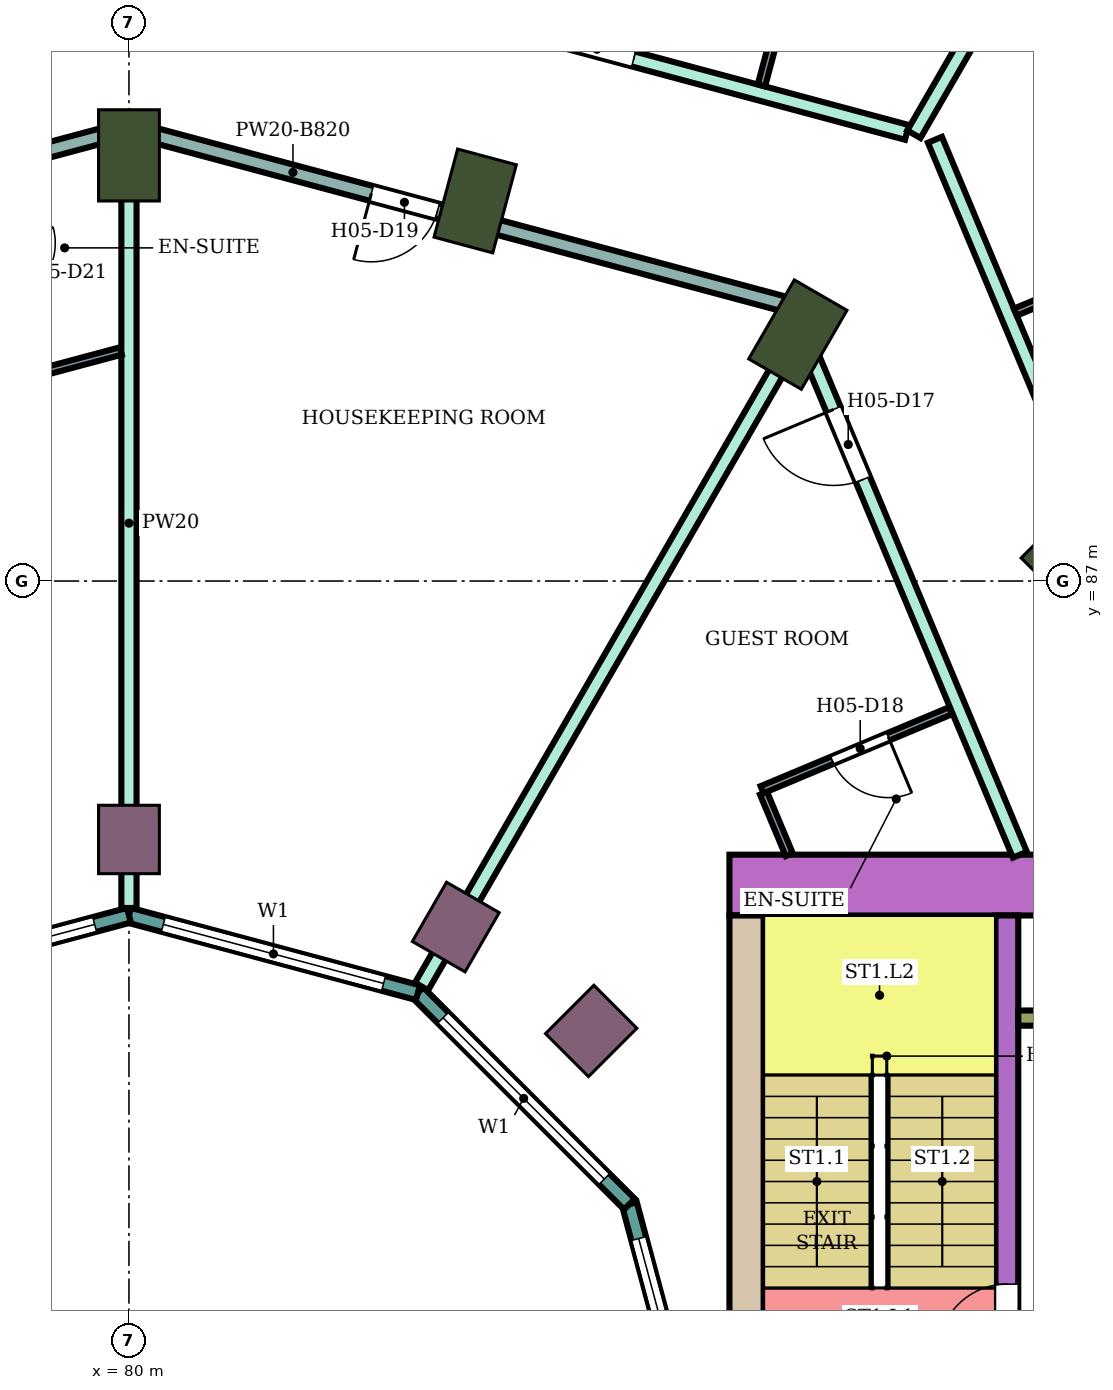
"""IFC4 building model, lengths in metres.
Left out: names, types, materials, properties, quantities, classifications, styles, units other than length and angle.
Written with IfcOpenShell. Run it as: python <this file> out.ifc"""

import sys

from ifc_helpers import new_model, si_unit, direction, frame, frame_2d, origin, origin_2d, place, context, subcontext, project, spatial, rectangle, extrude, element, fill, save


model = new_model("IFC4")
c1 = context("Model", 3, precision=1e-05, world=origin(), true_north=direction((0.0, 1.0)))
c2 = subcontext(c1, "Body", "Model", "MODEL_VIEW")
j1 = project(units=[si_unit("LENGTHUNIT", "METRE"), si_unit("PLANEANGLEUNIT", "RADIAN")], contexts=[c1])
p1 = place(None, origin())
s1 = spatial("IfcSite", under=j1, at=p1, CompositionType="ELEMENT")
p2 = place(p1, origin())
s2 = spatial("IfcBuilding", under=s1, at=p2, CompositionType="ELEMENT")
p3 = place(p2, frame((0.0, 0.0, 90.0)))
s3 = spatial("IfcBuildingStorey", under=s2, at=p3, CompositionType="ELEMENT", Elevation=90.0)
for number, where, z_axis, x_axis in (
    (1, (92.445, 87.445, 0.0), (0.0, 0.0, 1.0), (0.707, 0.707, 0.0)),
    (2, (88.8, 90.242, 0.0), (0.0, 0.0, 1.0), (0.5, 0.866, 0.0)),
    (3, (84.555, 92.0, 0.0), (0.0, 0.0, 1.0), (0.259, 0.966, 0.0)),
    (4, (80.0, 92.6, 0.0), (0.0, 0.0, 1.0), (0.0, 1.0, 0.0)),
):
    element("IfcColumn", number, at=place(p3, frame(where, z_axis=z_axis, x_axis=x_axis)), inside=s3, PredefinedType="COLUMN", context=c2, shape_type="SweptSolid", body=[
        extrude(rectangle(XDim=1.2, YDim=0.8, at=origin_2d()), origin(), (0.0, 0.0, 1.0), 3.8),
    ])
for number, where, z_axis, x_axis in (
    (5, (86.081, 81.081, 0.0), (0.0, 0.0, 1.0), (0.707, 0.707, 0.0)),
    (6, (84.3, 82.448, 0.0), (0.0, 0.0, 1.0), (0.5, 0.866, 0.0)),
    (7, (80.0, 83.6, 0.0), (0.0, 0.0, 1.0), (0.0, 1.0, 0.0)),
):
    element("IfcColumn", number, at=place(p3, frame(where, z_axis=z_axis, x_axis=x_axis)), inside=s3, PredefinedType="COLUMN", context=c2, shape_type="SweptSolid", body=[
        extrude(rectangle(XDim=0.9, YDim=0.8, at=origin_2d()), origin(), (0.0, 0.0, 1.0), 3.8),
    ])
p4 = place(p3, frame((87.9, 83.0, 0.0), z_axis=(0.0, 0.0, 1.0), x_axis=(1.0, 0.0, 0.0)))
e8 = element("IfcWall", 8, at=p4, inside=s3, PredefinedType="SHEAR", context=c2, shape_type="SweptSolid", body=[
    extrude(rectangle(XDim=14.7, YDim=0.8, at=frame_2d((7.35, 0.0))), origin(), (0.0, 0.0, 1.0), 3.48),
])
p5 = place(p4, frame((4.2, 0.0, 0.0)))
e9 = element("IfcOpeningElement", 9, at=p5, cuts=e8, PredefinedType="OPENING", context=c2, shape_type="SweptSolid", body=[
    extrude(rectangle(XDim=2.4, YDim=2.4, at=frame_2d((1.2, 1.2))), frame((0.0, 0.41, 0.0), z_axis=(0.0, -1.0, 0.0), x_axis=(1.0, 0.0, 0.0)), (0.0, 0.0, 1.0), 0.82),
])
p6 = place(p3, frame((88.125, 75.0, 0.0), z_axis=(0.0, 0.0, 1.0), x_axis=(0.0, 1.0, 0.0)))
e10 = element("IfcWall", 10, at=p6, inside=s3, PredefinedType="SHEAR", context=c2, shape_type="SweptSolid", body=[
    extrude(rectangle(XDim=7.6, YDim=0.45, at=frame_2d((3.8, 0.0))), origin(), (0.0, 0.0, 1.0), 3.48),
])
p7 = place(p3, frame((91.55, 75.0, 0.0), z_axis=(0.0, 0.0, 1.0), x_axis=(0.0, 1.0, 0.0)))
e11 = element("IfcWall", 11, at=p7, inside=s3, PredefinedType="SHEAR", context=c2, shape_type="SweptSolid", body=[
    extrude(rectangle(XDim=7.6, YDim=0.3, at=frame_2d((3.8, 0.0))), origin(), (0.0, 0.0, 1.0), 3.48),
])
p8 = place(p7, frame((1.85, 0.0, 0.0)))
e12 = element("IfcOpeningElement", 12, at=p8, cuts=e11, PredefinedType="OPENING", context=c2, shape_type="SweptSolid", body=[
    extrude(rectangle(XDim=0.9, YDim=2.1, at=frame_2d((0.45, 1.05))), frame((0.0, 0.16, 0.0), z_axis=(0.0, -1.0, 0.0), x_axis=(1.0, 0.0, 0.0)), (0.0, 0.0, 1.0), 0.32),
])
p9 = place(p3, frame((91.7, 81.25, 0.0), z_axis=(0.0, 0.0, 1.0), x_axis=(1.0, 0.0, 0.0)))
e13 = element("IfcWall", 13, at=p9, inside=s3, PredefinedType="SHEAR", context=c2, shape_type="SweptSolid", body=[
    extrude(rectangle(XDim=4.65, YDim=0.2, at=frame_2d((2.325, 0.0))), origin(), (0.0, 0.0, 1.0), 3.48),
])
p10 = place(p3, frame((87.604, 75.0, 0.0), z_axis=(0.0, 0.0, 1.0), x_axis=(-0.258789828301, 0.965933654434, 0.0)))
e14 = element("IfcWall", 14, at=p10, inside=s3, PredefinedType="NOTDEFINED", context=c2, shape_type="SweptSolid", body=[
    extrude(rectangle(XDim=3.936, YDim=0.2, at=frame_2d((1.968, 0.0))), origin(), (0.0, 0.0, 1.0), 3.8),
])
p11 = place(p10, frame((0.468, 0.0, 0.9)))
e15 = element("IfcOpeningElement", 15, at=p11, cuts=e14, PredefinedType="OPENING", context=c2, shape_type="SweptSolid", body=[
    extrude(rectangle(XDim=3.0, YDim=2.3, at=frame_2d((1.5, 1.15))), frame((0.0, 0.11, 0.0), z_axis=(0.0, -1.0, 0.0), x_axis=(1.0, 0.0, 0.0)), (0.0, 0.0, 1.0), 0.22),
])
p12 = place(p3, frame((86.585, 78.802, 0.0), z_axis=(0.0, 0.0, 1.0), x_axis=(-0.707106781187, 0.707106781187, 0.0)))
e16 = element("IfcWall", 16, at=p12, inside=s3, PredefinedType="NOTDEFINED", context=c2, shape_type="SweptSolid", body=[
    extrude(rectangle(XDim=3.936, YDim=0.2, at=frame_2d((1.968, 0.0))), origin(), (0.0, 0.0, 1.0), 3.8),
])
p13 = place(p12, frame((0.468, 0.0, 0.9)))
e17 = element("IfcOpeningElement", 17, at=p13, cuts=e16, PredefinedType="OPENING", context=c2, shape_type="SweptSolid", body=[
    extrude(rectangle(XDim=3.0, YDim=2.3, at=frame_2d((1.5, 1.15))), frame((0.0, 0.11, 0.0), z_axis=(0.0, -1.0, 0.0), x_axis=(1.0, 0.0, 0.0)), (0.0, 0.0, 1.0), 0.22),
])
p14 = place(p3, frame((83.802, 81.585, 0.0), z_axis=(0.0, 0.0, 1.0), x_axis=(-0.965933654434, 0.258789828301, 0.0)))
e18 = element("IfcWall", 18, at=p14, inside=s3, PredefinedType="NOTDEFINED", context=c2, shape_type="SweptSolid", body=[
    extrude(rectangle(XDim=3.936, YDim=0.2, at=frame_2d((1.968, 0.0))), origin(), (0.0, 0.0, 1.0), 3.8),
])
p15 = place(p14, frame((0.468, 0.0, 0.9)))
e19 = element("IfcOpeningElement", 19, at=p15, cuts=e18, PredefinedType="OPENING", context=c2, shape_type="SweptSolid", body=[
    extrude(rectangle(XDim=3.0, YDim=2.3, at=frame_2d((1.5, 1.15))), frame((0.0, 0.11, 0.0), z_axis=(0.0, -1.0, 0.0), x_axis=(1.0, 0.0, 0.0)), (0.0, 0.0, 1.0), 0.22),
])
p16 = place(p3, frame((80.0, 82.604, 0.0), z_axis=(0.0, 0.0, 1.0), x_axis=(-0.965933654434, -0.258789828301, 0.0)))
e20 = element("IfcWall", 20, at=p16, inside=s3, PredefinedType="NOTDEFINED", context=c2, shape_type="SweptSolid", body=[
    extrude(rectangle(XDim=3.936, YDim=0.2, at=frame_2d((1.968, 0.0))), origin(), (0.0, 0.0, 1.0), 3.8),
])
p17 = place(p16, frame((0.468, 0.0, 0.9)))
e21 = element("IfcOpeningElement", 21, at=p17, cuts=e20, PredefinedType="OPENING", context=c2, shape_type="SweptSolid", body=[
    extrude(rectangle(XDim=3.0, YDim=2.3, at=frame_2d((1.5, 1.15))), frame((0.0, 0.11, 0.0), z_axis=(0.0, -1.0, 0.0), x_axis=(1.0, 0.0, 0.0)), (0.0, 0.0, 1.0), 0.22),
])
p18 = place(p3, frame((69.397, 92.805, 0.0), z_axis=(0.0, 0.0, 1.0), x_axis=(0.96596468683, 0.258673972015, 0.0)))
e22 = element("IfcWall", 22, at=p18, inside=s3, PredefinedType="PARTITIONING", context=c2, shape_type="SweptSolid", body=[
    extrude(rectangle(XDim=10.937, YDim=0.2, at=frame_2d((5.469, 0.0))), origin(), (0.0, 0.0, 1.0), 3.35),
])
p19 = place(p18, frame((6.163, 0.0, 0.0)))
e23 = element("IfcOpeningElement", 23, at=p19, cuts=e22, PredefinedType="OPENING", context=c2, shape_type="SweptSolid", body=[
    extrude(rectangle(XDim=1.0, YDim=2.1, at=frame_2d((0.5, 1.05))), frame((0.0, 0.11, 0.0), z_axis=(0.0, -1.0, 0.0), x_axis=(1.0, 0.0, 0.0)), (0.0, 0.0, 1.0), 0.22),
])
p20 = place(p18, frame((4.103, 0.0, 0.0)))
e24 = element("IfcOpeningElement", 24, at=p20, cuts=e22, PredefinedType="OPENING", context=c2, shape_type="SweptSolid", body=[
    extrude(rectangle(XDim=1.0, YDim=2.1, at=frame_2d((0.5, 1.05))), frame((0.0, 0.11, 0.0), z_axis=(0.0, -1.0, 0.0), x_axis=(1.0, 0.0, 0.0)), (0.0, 0.0, 1.0), 0.22),
])
p21 = place(p3, frame((71.303, 90.625, 0.0), z_axis=(0.0, 0.0, 1.0), x_axis=(0.965971868307, 0.258647152776, 0.0)))
e25 = element("IfcWall", 25, at=p21, inside=s3, PredefinedType="PARTITIONING", context=c2, shape_type="SweptSolid", body=[
    extrude(rectangle(XDim=8.874, YDim=0.2, at=frame_2d((4.437, 0.0))), origin(), (0.0, 0.0, 1.0), 2.98),
])
p22 = place(p21, frame((0.55, 0.0, 0.0)))
e26 = element("IfcOpeningElement", 26, at=p22, cuts=e25, PredefinedType="OPENING", context=c2, shape_type="SweptSolid", body=[
    extrude(rectangle(XDim=1.0, YDim=2.1, at=frame_2d((0.5, 1.05))), frame((0.0, 0.11, 0.0), z_axis=(0.0, -1.0, 0.0), x_axis=(1.0, 0.0, 0.0)), (0.0, 0.0, 1.0), 0.22),
])
p23 = place(p3, frame((80.0, 82.699, 0.0), z_axis=(0.0, 0.0, 1.0), x_axis=(0.0, 1.0, 0.0)))
e27 = element("IfcWall", 27, at=p23, inside=s3, PredefinedType="PARTITIONING", context=c2, shape_type="SweptSolid", body=[
    extrude(rectangle(XDim=10.125, YDim=0.2, at=frame_2d((5.062, 0.0))), origin(), (0.0, 0.0, 1.0), 3.35),
])
p24 = place(p3, frame((80.0, 92.954, 0.0), z_axis=(0.0, 0.0, 1.0), x_axis=(0.965932194462, -0.258795277586, 0.0)))
e28 = element("IfcWall", 28, at=p24, inside=s3, PredefinedType="PARTITIONING", context=c2, shape_type="SweptSolid", body=[
    extrude(rectangle(XDim=8.934, YDim=0.2, at=frame_2d((4.467, 0.0))), origin(), (0.0, 0.0, 1.0), 2.98),
])
p25 = place(p24, frame((3.302, 0.0, 0.0)))
e29 = element("IfcOpeningElement", 29, at=p25, cuts=e28, PredefinedType="OPENING", context=c2, shape_type="SweptSolid", body=[
    extrude(rectangle(XDim=0.9, YDim=2.1, at=frame_2d((0.45, 1.05))), frame((0.0, 0.11, 0.0), z_axis=(0.0, -1.0, 0.0), x_axis=(1.0, 0.0, 0.0)), (0.0, 0.0, 1.0), 0.22),
])
p26 = place(p3, frame((80.0, 95.648, 0.0), z_axis=(0.0, 0.0, 1.0), x_axis=(0.965852259202, -0.259093445292, 0.0)))
e30 = element("IfcWall", 30, at=p26, inside=s3, PredefinedType="PARTITIONING", context=c2, shape_type="SweptSolid", body=[
    extrude(rectangle(XDim=10.597, YDim=0.2, at=frame_2d((5.298, 0.0))), origin(), (0.0, 0.0, 1.0), 3.35),
])
p27 = place(p26, frame((5.875, 0.0, 0.0)))
e31 = element("IfcOpeningElement", 31, at=p27, cuts=e30, PredefinedType="OPENING", context=c2, shape_type="SweptSolid", body=[
    extrude(rectangle(XDim=1.0, YDim=2.1, at=frame_2d((0.5, 1.05))), frame((0.0, 0.11, 0.0), z_axis=(0.0, -1.0, 0.0), x_axis=(1.0, 0.0, 0.0)), (0.0, 0.0, 1.0), 0.22),
])
p28 = place(p3, frame((83.85, 81.667, 0.0), z_axis=(0.0, 0.0, 1.0), x_axis=(0.500222212082, 0.865897071562, 0.0)))
e32 = element("IfcWall", 32, at=p28, inside=s3, PredefinedType="PARTITIONING", context=c2, shape_type="SweptSolid", body=[
    extrude(rectangle(XDim=9.768, YDim=0.2, at=frame_2d((4.884, 0.0))), origin(), (0.0, 0.0, 1.0), 3.35),
])
p29 = place(p3, frame((88.698, 90.624, 0.0), z_axis=(0.0, 0.0, 1.0), x_axis=(0.386027055918, -0.922487459047, 0.0)))
e33 = element("IfcWall", 33, at=p29, inside=s3, PredefinedType="PARTITIONING", context=c2, shape_type="SweptSolid", body=[
    extrude(rectangle(XDim=7.832, YDim=0.2, at=frame_2d((3.916, 0.0))), origin(), (0.0, 0.0, 1.0), 3.35),
])
p30 = place(p29, frame((1.482, 0.0, 0.0)))
e34 = element("IfcOpeningElement", 34, at=p30, cuts=e33, PredefinedType="OPENING", context=c2, shape_type="SweptSolid", body=[
    extrude(rectangle(XDim=1.0, YDim=2.1, at=frame_2d((0.5, 1.05))), frame((0.0, 0.11, 0.0), z_axis=(0.0, -1.0, 0.0), x_axis=(1.0, 0.0, 0.0)), (0.0, 0.0, 1.0), 0.22),
])
p31 = place(p3, frame((90.327, 92.878, 0.0), z_axis=(0.0, 0.0, 1.0), x_axis=(0.50022153717, 0.865897461453, 0.0)))
e35 = element("IfcWall", 35, at=p31, inside=s3, PredefinedType="PARTITIONING", context=c2, shape_type="SweptSolid", body=[
    extrude(rectangle(XDim=5.152, YDim=0.2, at=frame_2d((2.576, 0.0))), origin(), (0.0, 0.0, 1.0), 3.35),
])
p32 = place(p3, frame((90.604, 92.805, 0.0), z_axis=(0.0, 0.0, 1.0), x_axis=(0.386209298583, -0.922411176042, 0.0)))
e36 = element("IfcWall", 36, at=p32, inside=s3, PredefinedType="PARTITIONING", context=c2, shape_type="SweptSolid", body=[
    extrude(rectangle(XDim=8.48, YDim=0.2, at=frame_2d((4.24, 0.0))), origin(), (0.0, 0.0, 1.0), 3.35),
])
p33 = place(p32, frame((3.723, 0.0, 0.0)))
e37 = element("IfcOpeningElement", 37, at=p33, cuts=e36, PredefinedType="OPENING", context=c2, shape_type="SweptSolid", body=[
    extrude(rectangle(XDim=1.1, YDim=2.1, at=frame_2d((0.55, 1.05))), frame((0.0, 0.11, 0.0), z_axis=(0.0, -1.0, 0.0), x_axis=(1.0, 0.0, 0.0)), (0.0, 0.0, 1.0), 0.22),
])
p34 = place(p3, frame((78.696, 89.706, 0.0), z_axis=(0.0, 0.0, 1.0), x_axis=(0.966002513606, 0.258532674351, 0.0)))
e38 = element("IfcWall", 38, at=p34, inside=s3, PredefinedType="PARTITIONING", context=c2, shape_type="SweptSolid", body=[
    extrude(rectangle(XDim=1.24, YDim=0.1, at=frame_2d((0.62, 0.0))), origin(), (0.0, 0.0, 1.0), 3.35),
])
p35 = place(p3, frame((88.321, 93.521, 0.0), z_axis=(0.0, 0.0, 1.0), x_axis=(0.258677737588, 0.965963678446, 0.0)))
e39 = element("IfcWall", 39, at=p35, inside=s3, PredefinedType="PARTITIONING", context=c2, shape_type="SweptSolid", body=[
    extrude(rectangle(XDim=2.649, YDim=0.1, at=frame_2d((1.325, 0.0))), origin(), (0.0, 0.0, 1.0), 3.35),
])
p36 = place(p3, frame((88.348, 84.209, 0.0), z_axis=(0.0, 0.0, 1.0), x_axis=(0.386077497504, -0.922466349479, 0.0)))
e40 = element("IfcWall", 40, at=p36, inside=s3, PredefinedType="PARTITIONING", context=c2, shape_type="SweptSolid", body=[
    extrude(rectangle(XDim=0.877, YDim=0.1, at=frame_2d((0.438, 0.0))), origin(), (0.0, 0.0, 1.0), 3.35),
])
p37 = place(p3, frame((88.329, 84.255, 0.0), z_axis=(0.0, 0.0, 1.0), x_axis=(0.922320663728, 0.386425404522, 0.0)))
e41 = element("IfcWall", 41, at=p37, inside=s3, PredefinedType="PARTITIONING", context=c2, shape_type="SweptSolid", body=[
    extrude(rectangle(XDim=2.69, YDim=0.1, at=frame_2d((1.345, 0.0))), origin(), (0.0, 0.0, 1.0), 3.35),
])
p38 = place(p37, frame((1.0, 0.0, 0.0)))
e42 = element("IfcOpeningElement", 42, at=p38, cuts=e41, PredefinedType="OPENING", context=c2, shape_type="SweptSolid", body=[
    extrude(rectangle(XDim=0.8, YDim=2.1, at=frame_2d((0.4, 1.05))), frame((0.0, 0.06, 0.0), z_axis=(0.0, -1.0, 0.0), x_axis=(1.0, 0.0, 0.0)), (0.0, 0.0, 1.0), 0.12),
])
p39 = place(p3, frame((91.661, 90.538, 0.0), z_axis=(0.0, 0.0, 1.0), x_axis=(0.922352973625, 0.386348278169, 0.0)))
e43 = element("IfcWall", 43, at=p39, inside=s3, PredefinedType="PARTITIONING", context=c2, shape_type="SweptSolid", body=[
    extrude(rectangle(XDim=2.85, YDim=0.1, at=frame_2d((1.425, 0.0))), origin(), (0.0, 0.0, 1.0), 3.35),
])
p40 = place(p11, origin())
e44 = element("IfcWindow", 44, at=p40, inside=s3, PartitioningType="SINGLE_PANEL", PredefinedType="WINDOW", context=c2, shape_type="SweptSolid", body=[
    extrude(rectangle(XDim=3.0, YDim=2.3, at=frame_2d((1.5, 1.15))), frame((0.0, 0.03, 0.0), z_axis=(0.0, -1.0, 0.0), x_axis=(1.0, 0.0, 0.0)), (0.0, 0.0, 1.0), 0.06),
])
fill(e15, e44)
p41 = place(p13, origin())
e45 = element("IfcWindow", 45, at=p41, inside=s3, PartitioningType="SINGLE_PANEL", PredefinedType="WINDOW", context=c2, shape_type="SweptSolid", body=[
    extrude(rectangle(XDim=3.0, YDim=2.3, at=frame_2d((1.5, 1.15))), frame((0.0, 0.03, 0.0), z_axis=(0.0, -1.0, 0.0), x_axis=(1.0, 0.0, 0.0)), (0.0, 0.0, 1.0), 0.06),
])
fill(e17, e45)
p42 = place(p15, origin())
e46 = element("IfcWindow", 46, at=p42, inside=s3, PartitioningType="SINGLE_PANEL", PredefinedType="WINDOW", context=c2, shape_type="SweptSolid", body=[
    extrude(rectangle(XDim=3.0, YDim=2.3, at=frame_2d((1.5, 1.15))), frame((0.0, 0.03, 0.0), z_axis=(0.0, -1.0, 0.0), x_axis=(1.0, 0.0, 0.0)), (0.0, 0.0, 1.0), 0.06),
])
fill(e19, e46)
p43 = place(p17, origin())
e47 = element("IfcWindow", 47, at=p43, inside=s3, PartitioningType="SINGLE_PANEL", PredefinedType="WINDOW", context=c2, shape_type="SweptSolid", body=[
    extrude(rectangle(XDim=3.0, YDim=2.3, at=frame_2d((1.5, 1.15))), frame((0.0, 0.03, 0.0), z_axis=(0.0, -1.0, 0.0), x_axis=(1.0, 0.0, 0.0)), (0.0, 0.0, 1.0), 0.06),
])
fill(e21, e47)
p44 = place(p27, origin())
e48 = element("IfcDoor", 48, at=p44, inside=s3, OperationType="SINGLE_SWING_LEFT", PredefinedType="DOOR", context=c2, shape_type="SweptSolid", body=[
    extrude(rectangle(XDim=1.0, YDim=2.1, at=frame_2d((0.5, 1.05))), frame((0.0, 0.025, 0.0), z_axis=(0.0, -1.0, 0.0), x_axis=(1.0, 0.0, 0.0)), (0.0, 0.0, 1.0), 0.05),
])
fill(e31, e48)
p45 = place(p30, frame((1.0, 0.0, 0.0), z_axis=(0.0, 0.0, 1.0), x_axis=(-1.0, 0.0, 0.0)))
e49 = element("IfcDoor", 49, at=p45, inside=s3, OperationType="SINGLE_SWING_RIGHT", PredefinedType="DOOR", context=c2, shape_type="SweptSolid", body=[
    extrude(rectangle(XDim=1.0, YDim=2.1, at=frame_2d((0.5, 1.05))), frame((0.0, 0.025, 0.0), z_axis=(0.0, -1.0, 0.0), x_axis=(1.0, 0.0, 0.0)), (0.0, 0.0, 1.0), 0.05),
])
fill(e34, e49)
p46 = place(p38, frame((0.8, 0.0, 0.0), z_axis=(0.0, 0.0, 1.0), x_axis=(-1.0, 0.0, 0.0)))
e50 = element("IfcDoor", 50, at=p46, inside=s3, OperationType="SINGLE_SWING_LEFT", PredefinedType="DOOR", context=c2, shape_type="SweptSolid", body=[
    extrude(rectangle(XDim=0.8, YDim=2.1, at=frame_2d((0.4, 1.05))), frame((0.0, 0.025, 0.0), z_axis=(0.0, -1.0, 0.0), x_axis=(1.0, 0.0, 0.0)), (0.0, 0.0, 1.0), 0.05),
])
fill(e42, e50)
p47 = place(p25, frame((0.9, 0.0, 0.0), z_axis=(0.0, 0.0, 1.0), x_axis=(-1.0, 0.0, 0.0)))
e51 = element("IfcDoor", 51, at=p47, inside=s3, OperationType="SINGLE_SWING_RIGHT", PredefinedType="DOOR", context=c2, shape_type="SweptSolid", body=[
    extrude(rectangle(XDim=0.9, YDim=2.1, at=frame_2d((0.45, 1.05))), frame((0.0, 0.025, 0.0), z_axis=(0.0, -1.0, 0.0), x_axis=(1.0, 0.0, 0.0)), (0.0, 0.0, 1.0), 0.05),
])
fill(e29, e51)
p48 = place(p8, origin())
e52 = element("IfcDoor", 52, at=p48, inside=s3, OperationType="SINGLE_SWING_LEFT", PredefinedType="DOOR", context=c2, shape_type="SweptSolid", body=[
    extrude(rectangle(XDim=0.9, YDim=2.1, at=frame_2d((0.45, 1.05))), frame((0.0, 0.025, 0.0), z_axis=(0.0, -1.0, 0.0), x_axis=(1.0, 0.0, 0.0)), (0.0, 0.0, 1.0), 0.05),
])
fill(e12, e52)
save(model, sys.argv[1])
